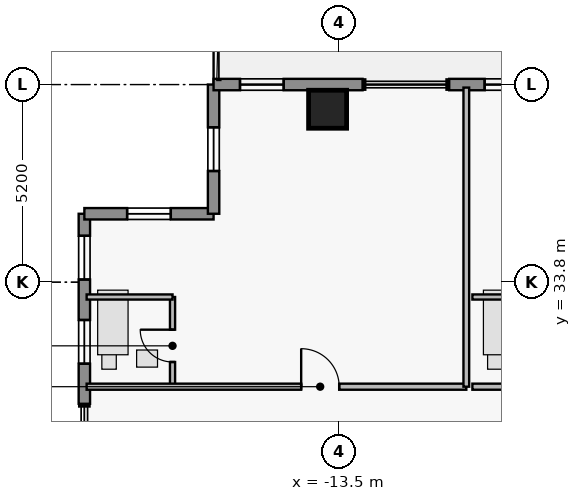
"""IFC4 building model, lengths in metres.
Left out: names, types, materials, properties, quantities, classifications, styles, units other than length and angle.
Written with IfcOpenShell. Run it as: python <this file> out.ifc"""

import sys

from ifc_helpers import new_model, si_unit, direction, frame, frame_2d, origin, origin_2d, place, context, subcontext, project, spatial, rectangle, extrude, element, fill, save


model = new_model("IFC4")
c1 = context("Model", 3, precision=1e-05, world=origin(), true_north=direction((0.0, 1.0)))
c2 = subcontext(c1, "Body", "Model", "MODEL_VIEW")
j1 = project(units=[si_unit("LENGTHUNIT", "METRE"), si_unit("PLANEANGLEUNIT", "RADIAN")], contexts=[c1])
p1 = place(None, origin())
s1 = spatial("IfcSite", under=j1, at=p1, CompositionType="ELEMENT")
p2 = place(p1, origin())
s2 = spatial("IfcBuilding", under=s1, at=p2, CompositionType="ELEMENT")
p3 = place(p2, frame((0.0, 0.0, 254.45)))
s3 = spatial("IfcBuildingStorey", under=s2, at=p3, CompositionType="ELEMENT", Elevation=254.45)
p4 = place(p3, frame((-13.8, 38.35, 0.0), z_axis=(0.0, 0.0, 1.0), x_axis=(1.0, 0.0, 0.0)))
e1 = element("IfcColumn", 1, at=p4, inside=s3, PredefinedType="COLUMN", context=c2, shape_type="SweptSolid", body=[
    extrude(rectangle(XDim=1.0, YDim=1.0, at=origin_2d()), origin(), (0.0, 0.0, 1.0), 3.7),
])
p5 = place(p3, frame((-20.2, 30.6, 0.0), z_axis=(0.0, 0.0, 1.0), x_axis=(0.0, 1.0, 0.0)))
e2 = element("IfcWall", 2, at=p5, inside=s3, PredefinedType="STANDARD", context=c2, shape_type="SweptSolid", body=[
    extrude(rectangle(XDim=5.0, YDim=0.3, at=frame_2d((2.5, 0.0))), origin(), (0.0, 0.0, 1.0), 3.48),
])
p6 = place(p5, frame((1.055, 0.0, 0.95)))
e3 = element("IfcOpeningElement", 3, at=p6, cuts=e2, PredefinedType="OPENING", context=c2, shape_type="SweptSolid", body=[
    extrude(rectangle(XDim=1.15, YDim=1.55, at=frame_2d((0.575, 0.775))), frame((0.0, 0.16, 0.0), z_axis=(0.0, -1.0, 0.0), x_axis=(1.0, 0.0, 0.0)), (0.0, 0.0, 1.0), 0.32),
])
p7 = place(p5, frame((3.27, 0.0, 0.95)))
e4 = element("IfcOpeningElement", 4, at=p7, cuts=e2, PredefinedType="OPENING", context=c2, shape_type="SweptSolid", body=[
    extrude(rectangle(XDim=1.15, YDim=1.55, at=frame_2d((0.575, 0.775))), frame((0.0, 0.16, 0.0), z_axis=(0.0, -1.0, 0.0), x_axis=(1.0, 0.0, 0.0)), (0.0, 0.0, 1.0), 0.32),
])
p8 = place(p3, frame((-20.2, 35.6, 0.0), z_axis=(0.0, 0.0, 1.0), x_axis=(1.0, 0.0, 0.0)))
e5 = element("IfcWall", 5, at=p8, inside=s3, PredefinedType="STANDARD", context=c2, shape_type="SweptSolid", body=[
    extrude(rectangle(XDim=3.4, YDim=0.3, at=frame_2d((1.7, 0.0))), origin(), (0.0, 0.0, 1.0), 3.48),
])
p9 = place(p8, frame((1.125, 0.0, 1.25)))
e6 = element("IfcOpeningElement", 6, at=p9, cuts=e5, PredefinedType="OPENING", context=c2, shape_type="SweptSolid", body=[
    extrude(rectangle(XDim=1.15, YDim=1.55, at=frame_2d((0.575, 0.775))), frame((0.0, 0.16, 0.0), z_axis=(0.0, -1.0, 0.0), x_axis=(1.0, 0.0, 0.0)), (0.0, 0.0, 1.0), 0.32),
])
p10 = place(p3, frame((-16.8, 35.6, 0.0), z_axis=(0.0, 0.0, 1.0), x_axis=(0.0, 1.0, 0.0)))
e7 = element("IfcWall", 7, at=p10, inside=s3, PredefinedType="STANDARD", context=c2, shape_type="SweptSolid", body=[
    extrude(rectangle(XDim=3.4, YDim=0.3, at=frame_2d((1.7, 0.0))), origin(), (0.0, 0.0, 1.0), 3.48),
])
p11 = place(p10, frame((1.125, 0.0, 1.25)))
e8 = element("IfcOpeningElement", 8, at=p11, cuts=e7, PredefinedType="OPENING", context=c2, shape_type="SweptSolid", body=[
    extrude(rectangle(XDim=1.15, YDim=1.55, at=frame_2d((0.575, 0.775))), frame((0.0, 0.16, 0.0), z_axis=(0.0, -1.0, 0.0), x_axis=(1.0, 0.0, 0.0)), (0.0, 0.0, 1.0), 0.32),
])
p12 = place(p3, frame((-16.8, 39.0, 0.0), z_axis=(0.0, 0.0, 1.0), x_axis=(1.0, 0.0, 0.0)))
e9 = element("IfcWall", 9, at=p12, inside=s3, PredefinedType="STANDARD", context=c2, shape_type="SweptSolid", body=[
    extrude(rectangle(XDim=3.92, YDim=0.3, at=frame_2d((1.96, 0.0))), origin(), (0.0, 0.0, 1.0), 3.48),
])
p13 = place(p12, frame((0.695, 0.0, 0.95)))
e10 = element("IfcOpeningElement", 10, at=p13, cuts=e9, PredefinedType="OPENING", context=c2, shape_type="SweptSolid", body=[
    extrude(rectangle(XDim=1.15, YDim=1.55, at=frame_2d((0.575, 0.775))), frame((0.0, 0.16, 0.0), z_axis=(0.0, -1.0, 0.0), x_axis=(1.0, 0.0, 0.0)), (0.0, 0.0, 1.0), 0.32),
])
p14 = place(p3, frame((-10.6, 39.0, 0.0), z_axis=(0.0, 0.0, 1.0), x_axis=(1.0, 0.0, 0.0)))
e11 = element("IfcWall", 11, at=p14, inside=s3, PredefinedType="STANDARD", context=c2, shape_type="SweptSolid", body=[
    extrude(rectangle(XDim=6.92, YDim=0.3, at=frame_2d((3.46, 0.0))), origin(), (0.0, 0.0, 1.0), 3.48),
])
p15 = place(p14, frame((2.695, 0.0, 0.85)))
e12 = element("IfcOpeningElement", 12, at=p15, cuts=e11, PredefinedType="OPENING", context=c2, shape_type="SweptSolid", body=[
    extrude(rectangle(XDim=1.6, YDim=1.8, at=frame_2d((0.8, 0.9))), frame((0.0, 0.16, 0.0), z_axis=(0.0, -1.0, 0.0), x_axis=(1.0, 0.0, 0.0)), (0.0, 0.0, 1.0), 0.32),
])
p16 = place(p14, frame((0.933, 0.0, 0.95)))
e13 = element("IfcOpeningElement", 13, at=p16, cuts=e11, PredefinedType="OPENING", context=c2, shape_type="SweptSolid", body=[
    extrude(rectangle(XDim=1.15, YDim=1.55, at=frame_2d((0.575, 0.775))), frame((0.0, 0.16, 0.0), z_axis=(0.0, -1.0, 0.0), x_axis=(1.0, 0.0, 0.0)), (0.0, 0.0, 1.0), 0.32),
])
p17 = place(p3, frame((-17.88, 31.05, 0.0), z_axis=(0.0, 0.0, 1.0), x_axis=(0.0, 1.0, 0.0)))
e14 = element("IfcWall", 14, at=p17, inside=s3, PredefinedType="PLUMBINGWALL", context=c2, shape_type="SweptSolid", body=[
    extrude(rectangle(XDim=2.36, YDim=0.135, at=frame_2d((1.18, 0.0))), origin(), (0.0, 0.0, 1.0), 3.48),
])
p18 = place(p17, frame((0.65, 0.0, 0.0)))
e15 = element("IfcOpeningElement", 15, at=p18, cuts=e14, PredefinedType="OPENING", context=c2, shape_type="SweptSolid", body=[
    extrude(rectangle(XDim=0.85, YDim=2.1, at=frame_2d((0.425, 1.05))), frame((0.0, 0.077, 0.0), z_axis=(0.0, -1.0, 0.0), x_axis=(1.0, 0.0, 0.0)), (0.0, 0.0, 1.0), 0.155),
])
p19 = place(p3, frame((-20.14, 31.05, 0.0), z_axis=(0.0, 0.0, 1.0), x_axis=(1.0, 0.0, 0.0)))
e16 = element("IfcWall", 16, at=p19, inside=s3, PredefinedType="PARTITIONING", context=c2, shape_type="SweptSolid", body=[
    extrude(rectangle(XDim=9.99, YDim=0.16, at=frame_2d((4.995, 0.0))), origin(), (0.0, 0.0, 1.0), 3.48),
])
p20 = place(p19, frame((5.645, 0.0, 0.0)))
e17 = element("IfcOpeningElement", 17, at=p20, cuts=e16, PredefinedType="OPENING", context=c2, shape_type="SweptSolid", body=[
    extrude(rectangle(XDim=1.0, YDim=2.15, at=frame_2d((0.5, 1.075))), frame((0.0, 0.09, 0.0), z_axis=(0.0, -1.0, 0.0), x_axis=(1.0, 0.0, 0.0)), (0.0, 0.0, 1.0), 0.18),
])
p21 = place(p3, frame((-9.99, 31.05, 0.0), z_axis=(0.0, 0.0, 1.0), x_axis=(1.0, 0.0, 0.0)))
e18 = element("IfcWall", 18, at=p21, inside=s3, PredefinedType="PARTITIONING", context=c2, shape_type="SweptSolid", body=[
    extrude(rectangle(XDim=9.99, YDim=0.16, at=frame_2d((4.995, 0.0))), origin(), (0.0, 0.0, 1.0), 3.48),
])
p22 = place(p21, frame((5.645, 0.0, 0.0)))
e19 = element("IfcOpeningElement", 19, at=p22, cuts=e18, PredefinedType="OPENING", context=c2, shape_type="SweptSolid", body=[
    extrude(rectangle(XDim=1.0, YDim=2.15, at=frame_2d((0.5, 1.075))), frame((0.0, 0.09, 0.0), z_axis=(0.0, -1.0, 0.0), x_axis=(1.0, 0.0, 0.0)), (0.0, 0.0, 1.0), 0.18),
])
p23 = place(p3, frame((-20.14, 33.41, 0.0), z_axis=(0.0, 0.0, 1.0), x_axis=(1.0, 0.0, 0.0)))
e20 = element("IfcWall", 20, at=p23, inside=s3, PredefinedType="PLUMBINGWALL", context=c2, shape_type="SweptSolid", body=[
    extrude(rectangle(XDim=2.26, YDim=0.135, at=frame_2d((1.13, 0.0))), origin(), (0.0, 0.0, 1.0), 3.48),
])
p24 = place(p3, frame((-10.15, 31.05, 0.0), z_axis=(0.0, 0.0, 1.0), x_axis=(0.0, 1.0, 0.0)))
e21 = element("IfcWall", 21, at=p24, inside=s3, PredefinedType="PARTITIONING", context=c2, shape_type="SweptSolid", body=[
    extrude(rectangle(XDim=7.87, YDim=0.15, at=frame_2d((3.935, 0.0))), origin(), (0.0, 0.0, 1.0), 3.48),
])
p25 = place(p3, frame((-9.99, 33.41, 0.0), z_axis=(0.0, 0.0, 1.0), x_axis=(1.0, 0.0, 0.0)))
e22 = element("IfcWall", 22, at=p25, inside=s3, PredefinedType="PLUMBINGWALL", context=c2, shape_type="SweptSolid", body=[
    extrude(rectangle(XDim=2.26, YDim=0.135, at=frame_2d((1.13, 0.0))), origin(), (0.0, 0.0, 1.0), 3.076),
])
p26 = place(p6, origin())
e23 = element("IfcWindow", 23, at=p26, inside=s3, PartitioningType="SINGLE_PANEL", PredefinedType="WINDOW", context=c2, shape_type="SweptSolid", body=[
    extrude(rectangle(XDim=1.15, YDim=1.55, at=frame_2d((0.575, 0.775))), frame((0.0, 0.03, 0.0), z_axis=(0.0, -1.0, 0.0), x_axis=(1.0, 0.0, 0.0)), (0.0, 0.0, 1.0), 0.06),
])
fill(e3, e23)
p27 = place(p7, origin())
e24 = element("IfcWindow", 24, at=p27, inside=s3, PartitioningType="SINGLE_PANEL", PredefinedType="WINDOW", context=c2, shape_type="SweptSolid", body=[
    extrude(rectangle(XDim=1.15, YDim=1.55, at=frame_2d((0.575, 0.775))), frame((0.0, 0.03, 0.0), z_axis=(0.0, -1.0, 0.0), x_axis=(1.0, 0.0, 0.0)), (0.0, 0.0, 1.0), 0.06),
])
fill(e4, e24)
p28 = place(p9, origin())
e25 = element("IfcWindow", 25, at=p28, inside=s3, PartitioningType="SINGLE_PANEL", PredefinedType="WINDOW", context=c2, shape_type="SweptSolid", body=[
    extrude(rectangle(XDim=1.15, YDim=1.55, at=frame_2d((0.575, 0.775))), frame((0.0, 0.03, 0.0), z_axis=(0.0, -1.0, 0.0), x_axis=(1.0, 0.0, 0.0)), (0.0, 0.0, 1.0), 0.06),
])
fill(e6, e25)
p29 = place(p11, origin())
e26 = element("IfcWindow", 26, at=p29, inside=s3, PartitioningType="SINGLE_PANEL", PredefinedType="WINDOW", context=c2, shape_type="SweptSolid", body=[
    extrude(rectangle(XDim=1.15, YDim=1.55, at=frame_2d((0.575, 0.775))), frame((0.0, 0.03, 0.0), z_axis=(0.0, -1.0, 0.0), x_axis=(1.0, 0.0, 0.0)), (0.0, 0.0, 1.0), 0.06),
])
fill(e8, e26)
p30 = place(p13, origin())
e27 = element("IfcWindow", 27, at=p30, inside=s3, PartitioningType="SINGLE_PANEL", PredefinedType="WINDOW", context=c2, shape_type="SweptSolid", body=[
    extrude(rectangle(XDim=1.15, YDim=1.55, at=frame_2d((0.575, 0.775))), frame((0.0, 0.03, 0.0), z_axis=(0.0, -1.0, 0.0), x_axis=(1.0, 0.0, 0.0)), (0.0, 0.0, 1.0), 0.06),
])
fill(e10, e27)
p31 = place(p16, origin())
e28 = element("IfcWindow", 28, at=p31, inside=s3, PartitioningType="SINGLE_PANEL", PredefinedType="WINDOW", context=c2, shape_type="SweptSolid", body=[
    extrude(rectangle(XDim=1.15, YDim=1.55, at=frame_2d((0.575, 0.775))), frame((0.0, 0.03, 0.0), z_axis=(0.0, -1.0, 0.0), x_axis=(1.0, 0.0, 0.0)), (0.0, 0.0, 1.0), 0.06),
])
fill(e13, e28)
p32 = place(p18, origin())
e29 = element("IfcDoor", 29, at=p32, inside=s3, OperationType="SINGLE_SWING_RIGHT", PredefinedType="DOOR", context=c2, shape_type="SweptSolid", body=[
    extrude(rectangle(XDim=0.85, YDim=2.1, at=frame_2d((0.425, 1.05))), frame((0.0, 0.025, 0.0), z_axis=(0.0, -1.0, 0.0), x_axis=(1.0, 0.0, 0.0)), (0.0, 0.0, 1.0), 0.05),
])
fill(e15, e29)
p33 = place(p20, origin())
e30 = element("IfcDoor", 30, at=p33, inside=s3, OperationType="SINGLE_SWING_LEFT", PredefinedType="DOOR", context=c2, shape_type="SweptSolid", body=[
    extrude(rectangle(XDim=1.0, YDim=2.15, at=frame_2d((0.5, 1.075))), frame((0.0, 0.025, 0.0), z_axis=(0.0, -1.0, 0.0), x_axis=(1.0, 0.0, 0.0)), (0.0, 0.0, 1.0), 0.05),
])
fill(e17, e30)
save(model, sys.argv[1])
